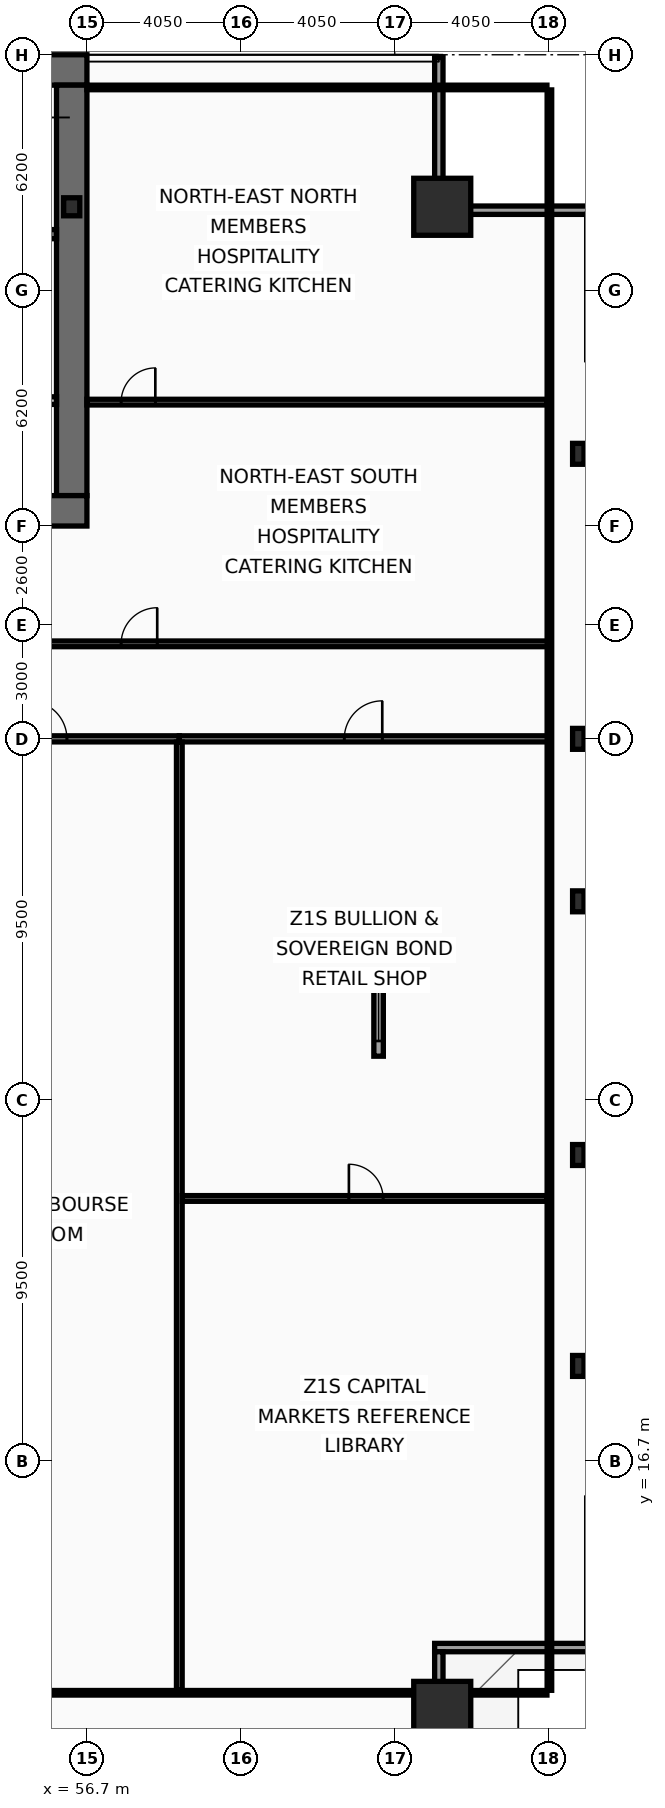
"""IFC4 building model, lengths in metres.
Left out: names, types, materials, properties, quantities, classifications, styles, units other than length and angle.
Written with IfcOpenShell. Run it as: python <this file> out.ifc"""

import sys

from ifc_helpers import new_model, si_unit, direction, frame, frame_2d, origin, origin_2d, place, context, subcontext, project, spatial, rectangle, hollow_rectangle, i_section, extrude, element, fill, save


model = new_model("IFC4")
c1 = context("Model", 3, precision=1e-05, world=origin(), true_north=direction((0.0, 1.0)))
c2 = subcontext(c1, "Body", "Model", "MODEL_VIEW")
j1 = project(units=[si_unit("LENGTHUNIT", "METRE"), si_unit("PLANEANGLEUNIT", "RADIAN")], contexts=[c1])
p1 = place(None, origin())
s1 = spatial("IfcSite", under=j1, at=p1, CompositionType="ELEMENT")
p2 = place(p1, origin())
s2 = spatial("IfcBuilding", under=s1, at=p2, CompositionType="ELEMENT")
p3 = place(p2, frame((0.0, 0.0, 81.8)))
s3 = spatial("IfcBuildingStorey", under=s2, at=p3, CompositionType="ELEMENT", Elevation=81.8)
p4 = place(p3, frame((16.2, 53.3, 0.0), z_axis=(0.0, 0.0, 1.0), x_axis=(1.0, 0.0, 0.0)))
e1 = element("IfcWall", 1, at=p4, inside=s3, PredefinedType="SHEAR", context=c2, shape_type="SweptSolid", body=[
    extrude(rectangle(XDim=40.5, YDim=0.8, at=frame_2d((20.25, 0.0))), origin(), (0.0, 0.0, 1.0), 3.78),
])
p5 = place(p3, frame((56.3, 52.9, 0.0), z_axis=(0.0, 0.0, 1.0), x_axis=(0.0, -1.0, 0.0)))
e2 = element("IfcWall", 2, at=p5, inside=s3, PredefinedType="SHEAR", context=c2, shape_type="SweptSolid", body=[
    extrude(rectangle(XDim=10.8, YDim=0.8, at=frame_2d((5.4, 0.0))), origin(), (0.0, 0.0, 1.0), 3.78),
])
p6 = place(p3, frame((56.7, 41.7, 0.0), z_axis=(0.0, 0.0, 1.0), x_axis=(-1.0, 0.0, 0.0)))
e3 = element("IfcWall", 3, at=p6, inside=s3, PredefinedType="SHEAR", context=c2, shape_type="SweptSolid", body=[
    extrude(rectangle(XDim=2.45, YDim=0.8, at=frame_2d((1.225, 0.0))), origin(), (0.0, 0.0, 1.0), 3.78),
])
p7 = place(p3, frame((48.63, 48.98, 0.0), z_axis=(0.0, 0.0, 1.0), x_axis=(1.0, 0.0, 0.0)))
e4 = element("IfcWall", 4, at=p7, inside=s3, PredefinedType="SHEAR", context=c2, shape_type="SweptSolid", body=[
    extrude(rectangle(XDim=7.27, YDim=0.24, at=frame_2d((3.635, 0.0))), origin(), (0.0, 0.0, 1.0), 3.78),
])
p8 = place(p7, frame((6.0, 0.0, 0.0)))
e5 = element("IfcOpeningElement", 5, at=p8, cuts=e4, PredefinedType="OPENING", context=c2, shape_type="SweptSolid", body=[
    extrude(rectangle(XDim=1.05, YDim=2.15, at=frame_2d((0.525, 1.075))), frame((0.0, 0.13, 0.0), z_axis=(0.0, -1.0, 0.0), x_axis=(1.0, 0.0, 0.0)), (0.0, 0.0, 1.0), 0.26),
])
for number, where, z_axis, x_axis in (
    (6, (66.05, 10.15, 0.0), (0.0, 0.0, 1.0), (1.0, 0.0, 0.0)),
    (7, (66.05, 49.7, 0.0), (0.0, 0.0, 1.0), (1.0, 0.0, 0.0)),
):
    element("IfcColumn", number, at=place(p3, frame(where, z_axis=z_axis, x_axis=x_axis)), inside=s3, PredefinedType="COLUMN", context=c2, shape_type="SweptSolid", body=[
        extrude(hollow_rectangle(XDim=1.5, YDim=1.5, WallThickness=0.07, at=origin_2d()), origin(), (0.0, 0.0, 1.0), 4.0),
    ])
for number, where, z_axis, x_axis in (
    (8, (69.63, 19.2, 0.0), (0.0, 0.0, 1.0), (1.0, 0.0, 0.0)),
    (9, (69.63, 24.75, 0.0), (0.0, 0.0, 1.0), (1.0, 0.0, 0.0)),
    (10, (69.63, 31.425, 0.0), (0.0, 0.0, 1.0), (1.0, 0.0, 0.0)),
    (11, (69.63, 35.7, 0.0), (0.0, 0.0, 1.0), (1.0, 0.0, 0.0)),
    (12, (69.63, 43.2, 0.0), (0.0, 0.0, 1.0), (1.0, 0.0, 0.0)),
):
    element("IfcColumn", number, at=place(p3, frame(where, z_axis=z_axis, x_axis=x_axis)), inside=s3, PredefinedType="COLUMN", context=c2, shape_type="SweptSolid", body=[
        extrude(i_section(OverallWidth=0.3, OverallDepth=0.55, WebThickness=0.015, FlangeThickness=0.029, at=origin_2d()), origin(), (0.0, 0.0, 1.0), 4.0),
    ])
p9 = place(p3, frame((56.3, 49.7, 0.0), z_axis=(0.0, 0.0, 1.0), x_axis=(1.0, 0.0, 0.0)))
e13 = element("IfcColumn", 13, at=p9, inside=s3, PredefinedType="COLUMN", context=c2, shape_type="SweptSolid", body=[
    extrude(i_section(OverallWidth=0.424, OverallDepth=0.474, WebThickness=0.048, FlangeThickness=0.077, at=origin_2d()), origin(), (0.0, 0.0, 1.0), 4.0),
])
p10 = place(p3, frame((65.96, 53.63, 0.0), z_axis=(0.0, 0.0, 1.0), x_axis=(0.0, -1.0, 0.0)))
e14 = element("IfcWall", 14, at=p10, inside=s3, PredefinedType="SOLIDWALL", context=c2, shape_type="SweptSolid", body=[
    extrude(rectangle(XDim=3.91, YDim=0.22, at=frame_2d((1.955, 0.0))), origin(), (0.0, 0.0, 1.0), 3.12),
])
for number, where, z_axis, x_axis in (
    (15, (65.85, 49.61, 0.0), (0.0, 0.0, 1.0), (1.0, 0.0, 0.0)),
    (16, (70.07, 11.79, 0.0), (0.0, 0.0, 1.0), (-1.0, 0.0, 0.0)),
):
    element("IfcWall", number, at=place(p3, frame(where, z_axis=z_axis, x_axis=x_axis)), inside=s3, PredefinedType="SOLIDWALL", context=c2, shape_type="SweptSolid", body=[
        extrude(rectangle(XDim=4.22, YDim=0.22, at=frame_2d((2.11, 0.0))), origin(), (0.0, 0.0, 1.0), 3.12),
    ])
p11 = place(p3, frame((65.96, 11.68, 0.0), z_axis=(0.0, 0.0, 1.0), x_axis=(0.0, -1.0, 0.0)))
e17 = element("IfcWall", 17, at=p11, inside=s3, PredefinedType="SOLIDWALL", context=c2, shape_type="SweptSolid", body=[
    extrude(rectangle(XDim=3.91, YDim=0.22, at=frame_2d((1.955, 0.0))), origin(), (0.0, 0.0, 1.0), 3.12),
])
p12 = place(p3, frame((64.375, 27.35, 0.0), z_axis=(0.0, 0.0, 1.0), x_axis=(0.0, 1.0, 0.0)))
e18 = element("IfcWall", 18, at=p12, inside=s3, PredefinedType="PARAPET", context=c2, shape_type="SweptSolid", body=[
    extrude(rectangle(XDim=2.2, YDim=0.25, at=frame_2d((1.1, 0.0))), origin(), (0.0, 0.0, 1.0), 0.88),
])
p13 = place(p12, frame((0.4, 0.0, 0.16)))
e19 = element("IfcOpeningElement", 19, at=p13, cuts=e18, PredefinedType="OPENING", context=c2, shape_type="SweptSolid", body=[
    extrude(rectangle(XDim=1.4, YDim=0.5, at=frame_2d((0.7, 0.25))), frame((0.0, 0.135, 0.0), z_axis=(0.0, -1.0, 0.0), x_axis=(1.0, 0.0, 0.0)), (0.0, 0.0, 1.0), 0.27),
])
p14 = place(p3, frame((51.9, 44.6, 0.0), z_axis=(0.0, 0.0, 1.0), x_axis=(1.0, 0.0, 0.0)))
e20 = element("IfcWall", 20, at=p14, inside=s3, PredefinedType="PARTITIONING", context=c2, shape_type="SweptSolid", body=[
    extrude(rectangle(XDim=4.0, YDim=0.2, at=frame_2d((2.0, 0.0))), origin(), (0.0, 0.0, 1.0), 3.78),
])
p15 = place(p14, frame((1.15, 0.0, 0.0)))
e21 = element("IfcOpeningElement", 21, at=p15, cuts=e20, PredefinedType="OPENING", context=c2, shape_type="SweptSolid", body=[
    extrude(rectangle(XDim=1.05, YDim=2.15, at=frame_2d((0.525, 1.075))), frame((0.0, 0.11, 0.0), z_axis=(0.0, -1.0, 0.0), x_axis=(1.0, 0.0, 0.0)), (0.0, 0.0, 1.0), 0.22),
])
p16 = place(p3, frame((54.35, 38.2, 0.0), z_axis=(0.0, 0.0, 1.0), x_axis=(1.0, 0.0, 0.0)))
e22 = element("IfcWall", 22, at=p16, inside=s3, PredefinedType="PARTITIONING", context=c2, shape_type="SweptSolid", body=[
    extrude(rectangle(XDim=14.52, YDim=0.15, at=frame_2d((7.26, 0.0))), origin(), (0.0, 0.0, 1.0), 2.97),
])
p17 = place(p16, frame((3.25, 0.0, 0.0)))
e23 = element("IfcOpeningElement", 23, at=p17, cuts=e22, PredefinedType="OPENING", context=c2, shape_type="SweptSolid", body=[
    extrude(rectangle(XDim=0.95, YDim=2.05, at=frame_2d((0.475, 1.025))), frame((0.0, 0.085, 0.0), z_axis=(0.0, -1.0, 0.0), x_axis=(1.0, 0.0, 0.0)), (0.0, 0.0, 1.0), 0.17),
])
p18 = place(p3, frame((56.7, 44.56, 0.0), z_axis=(0.0, 0.0, 1.0), x_axis=(1.0, 0.0, 0.0)))
e24 = element("IfcWall", 24, at=p18, inside=s3, PredefinedType="PARTITIONING", context=c2, shape_type="SweptSolid", body=[
    extrude(rectangle(XDim=12.105, YDim=0.15, at=frame_2d((6.052, 0.0))), origin(), (0.0, 0.0, 1.0), 3.12),
])
p19 = place(p18, frame((0.9, 0.0, 0.0)))
e25 = element("IfcOpeningElement", 25, at=p19, cuts=e24, PredefinedType="OPENING", context=c2, shape_type="SweptSolid", body=[
    extrude(rectangle(XDim=0.9, YDim=2.05, at=frame_2d((0.45, 1.025))), frame((0.0, 0.085, 0.0), z_axis=(0.0, -1.0, 0.0), x_axis=(1.0, 0.0, 0.0)), (0.0, 0.0, 1.0), 0.17),
])
p20 = place(p3, frame((50.498, 35.7, 0.0), z_axis=(0.0, 0.0, 1.0), x_axis=(1.0, 0.0, 0.0)))
e26 = element("IfcWall", 26, at=p20, inside=s3, PredefinedType="PARTITIONING", context=c2, shape_type="SweptSolid", body=[
    extrude(rectangle(XDim=8.633, YDim=0.16, at=frame_2d((4.316, 0.0))), origin(), (0.0, 0.0, 1.0), 2.97),
])
p21 = place(p20, frame((4.676, 0.0, 0.0)))
e27 = element("IfcOpeningElement", 27, at=p21, cuts=e26, PredefinedType="OPENING", context=c2, shape_type="SweptSolid", body=[
    extrude(rectangle(XDim=1.0, YDim=2.05, at=frame_2d((0.5, 1.025))), frame((0.0, 0.09, 0.0), z_axis=(0.0, -1.0, 0.0), x_axis=(1.0, 0.0, 0.0)), (0.0, 0.0, 1.0), 0.18),
])
p22 = place(p3, frame((59.131, 35.7, 0.0), z_axis=(0.0, 0.0, 1.0), x_axis=(1.0, 0.0, 0.0)))
e28 = element("IfcWall", 28, at=p22, inside=s3, PredefinedType="PARTITIONING", context=c2, shape_type="SweptSolid", body=[
    extrude(rectangle(XDim=9.739, YDim=0.16, at=frame_2d((4.869, 0.0))), origin(), (0.0, 0.0, 1.0), 2.97),
])
p23 = place(p22, frame((4.34, 0.0, 0.0)))
e29 = element("IfcOpeningElement", 29, at=p23, cuts=e28, PredefinedType="OPENING", context=c2, shape_type="SweptSolid", body=[
    extrude(rectangle(XDim=1.0, YDim=2.05, at=frame_2d((0.5, 1.025))), frame((0.0, 0.09, 0.0), z_axis=(0.0, -1.0, 0.0), x_axis=(1.0, 0.0, 0.0)), (0.0, 0.0, 1.0), 0.18),
])
p24 = place(p3, frame((59.131, 10.665, 0.0), z_axis=(0.0, 0.0, 1.0), x_axis=(0.0, 1.0, 0.0)))
e30 = element("IfcWall", 30, at=p24, inside=s3, PredefinedType="PARTITIONING", context=c2, shape_type="SweptSolid", body=[
    extrude(rectangle(XDim=24.95, YDim=0.15, at=frame_2d((12.475, 0.0))), origin(), (0.0, 0.0, 1.0), 2.97),
])
p25 = place(p3, frame((59.211, 23.607, 0.0), z_axis=(0.0, 0.0, 1.0), x_axis=(1.0, 0.0, 0.0)))
e31 = element("IfcWall", 31, at=p25, inside=s3, PredefinedType="PARTITIONING", context=c2, shape_type="SweptSolid", body=[
    extrude(rectangle(XDim=9.594, YDim=0.15, at=frame_2d((4.797, 0.0))), origin(), (0.0, 0.0, 1.0), 3.78),
])
p26 = place(p25, frame((4.382, 0.0, 0.0)))
e32 = element("IfcOpeningElement", 32, at=p26, cuts=e31, PredefinedType="OPENING", context=c2, shape_type="SweptSolid", body=[
    extrude(rectangle(XDim=0.9, YDim=2.05, at=frame_2d((0.45, 1.025))), frame((0.0, 0.085, 0.0), z_axis=(0.0, -1.0, 0.0), x_axis=(1.0, 0.0, 0.0)), (0.0, 0.0, 1.0), 0.17),
])
p27 = place(p3, frame((68.87, 10.665, 0.0), z_axis=(0.0, 0.0, 1.0), x_axis=(0.0, 1.0, 0.0)))
e33 = element("IfcWall", 33, at=p27, inside=s3, PredefinedType="PARTITIONING", context=c2, shape_type="SweptSolid", body=[
    extrude(rectangle(XDim=42.11, YDim=0.12, at=frame_2d((21.055, 0.0))), origin(), (0.0, 0.0, 1.0), 2.97),
])
p28 = place(p3, frame((56.7, 52.84, 0.0), z_axis=(0.0, 0.0, 1.0), x_axis=(1.0, 0.0, 0.0)))
e34 = element("IfcWall", 34, at=p28, inside=s3, PredefinedType="PARTITIONING", context=c2, shape_type="SweptSolid", body=[
    extrude(rectangle(XDim=12.105, YDim=0.12, at=frame_2d((6.052, 0.0))), origin(), (0.0, 0.0, 1.0), 3.78),
])
p29 = place(p3, frame((4.095, 10.6, 0.0), z_axis=(0.0, 0.0, 1.0), x_axis=(1.0, 0.0, 0.0)))
e35 = element("IfcWall", 35, at=p29, inside=s3, PredefinedType="PARTITIONING", context=c2, shape_type="SweptSolid", body=[
    extrude(rectangle(XDim=64.71, YDim=0.12, at=frame_2d((32.355, 0.0))), origin(), (0.0, 0.0, 1.0), 2.97),
])
p30 = place(p13, origin())
e36 = element("IfcWindow", 36, at=p30, inside=s3, PartitioningType="SINGLE_PANEL", PredefinedType="SKYLIGHT", context=c2, shape_type="SweptSolid", body=[
    extrude(rectangle(XDim=1.4, YDim=0.5, at=frame_2d((0.7, 0.25))), frame((0.0, 0.03, 0.0), z_axis=(0.0, -1.0, 0.0), x_axis=(1.0, 0.0, 0.0)), (0.0, 0.0, 1.0), 0.06),
])
fill(e19, e36)
p31 = place(p17, origin())
e37 = element("IfcDoor", 37, at=p31, inside=s3, OperationType="SINGLE_SWING_RIGHT", PredefinedType="DOOR", context=c2, shape_type="SweptSolid", body=[
    extrude(rectangle(XDim=0.95, YDim=2.05, at=frame_2d((0.475, 1.025))), frame((0.0, 0.025, 0.0), z_axis=(0.0, -1.0, 0.0), x_axis=(1.0, 0.0, 0.0)), (0.0, 0.0, 1.0), 0.05),
])
fill(e23, e37)
p32 = place(p19, origin())
e38 = element("IfcDoor", 38, at=p32, inside=s3, OperationType="SINGLE_SWING_RIGHT", PredefinedType="DOOR", context=c2, shape_type="SweptSolid", body=[
    extrude(rectangle(XDim=0.9, YDim=2.05, at=frame_2d((0.45, 1.025))), frame((0.0, 0.025, 0.0), z_axis=(0.0, -1.0, 0.0), x_axis=(1.0, 0.0, 0.0)), (0.0, 0.0, 1.0), 0.05),
])
fill(e25, e38)
p33 = place(p21, origin())
e39 = element("IfcDoor", 39, at=p33, inside=s3, OperationType="SINGLE_SWING_LEFT", PredefinedType="DOOR", context=c2, shape_type="SweptSolid", body=[
    extrude(rectangle(XDim=1.0, YDim=2.05, at=frame_2d((0.5, 1.025))), frame((0.0, 0.025, 0.0), z_axis=(0.0, -1.0, 0.0), x_axis=(1.0, 0.0, 0.0)), (0.0, 0.0, 1.0), 0.05),
])
fill(e27, e39)
p34 = place(p23, origin())
e40 = element("IfcDoor", 40, at=p34, inside=s3, OperationType="SINGLE_SWING_RIGHT", PredefinedType="DOOR", context=c2, shape_type="SweptSolid", body=[
    extrude(rectangle(XDim=1.0, YDim=2.05, at=frame_2d((0.5, 1.025))), frame((0.0, 0.025, 0.0), z_axis=(0.0, -1.0, 0.0), x_axis=(1.0, 0.0, 0.0)), (0.0, 0.0, 1.0), 0.05),
])
fill(e29, e40)
p35 = place(p26, origin())
e41 = element("IfcDoor", 41, at=p35, inside=s3, OperationType="SINGLE_SWING_LEFT", PredefinedType="DOOR", context=c2, shape_type="SweptSolid", body=[
    extrude(rectangle(XDim=0.9, YDim=2.05, at=frame_2d((0.45, 1.025))), frame((0.0, 0.025, 0.0), z_axis=(0.0, -1.0, 0.0), x_axis=(1.0, 0.0, 0.0)), (0.0, 0.0, 1.0), 0.05),
])
fill(e32, e41)
save(model, sys.argv[1])
